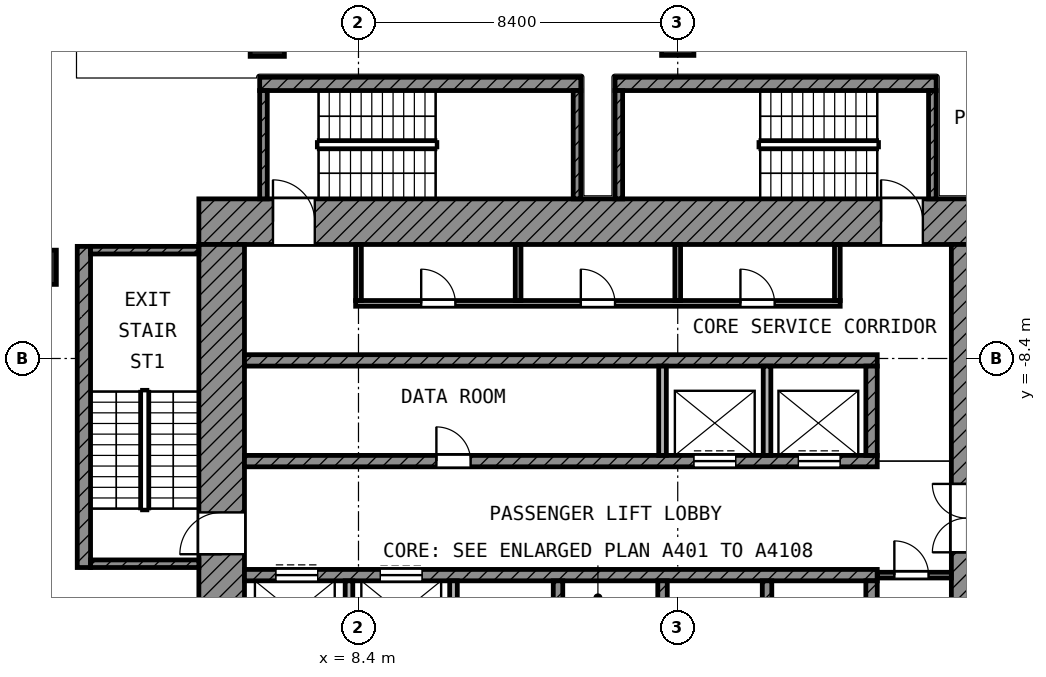
"""IFC4 building model, lengths in metres.
Left out: names, types, materials, properties, quantities, classifications, styles, units other than length and angle.
Written with IfcOpenShell. Run it as: python <this file> out.ifc"""

import sys

from ifc_helpers import new_model, si_unit, direction, frame, frame_2d, origin, origin_2d, place, context, subcontext, project, spatial, rectangle, extrude, element, fill, save


model = new_model("IFC4")
c1 = context("Model", 3, precision=1e-05, world=origin(), true_north=direction((0.0, 1.0)))
c2 = subcontext(c1, "Body", "Model", "MODEL_VIEW")
j1 = project(units=[si_unit("LENGTHUNIT", "METRE"), si_unit("PLANEANGLEUNIT", "RADIAN")], contexts=[c1])
p1 = place(None, origin())
s1 = spatial("IfcSite", under=j1, at=p1, CompositionType="ELEMENT")
p2 = place(p1, origin())
s2 = spatial("IfcBuilding", under=s1, at=p2, CompositionType="ELEMENT")
p3 = place(p2, frame((0.0, 0.0, 230.6)))
s3 = spatial("IfcBuildingStorey", under=s2, at=p3, CompositionType="ELEMENT", Elevation=230.6)
p4 = place(p3, frame((6.0, 0.0, 0.0), z_axis=(0.0, 0.0, 1.0), x_axis=(1.0, 0.0, 0.0)))
e1 = element("IfcColumn", 1, at=p4, inside=s3, PredefinedType="COLUMN", context=c2, shape_type="SweptSolid", body=[
    extrude(rectangle(XDim=0.9, YDim=0.9, at=origin_2d()), origin(), (0.0, 0.0, 1.0), 4.2),
])
p5 = place(p3, frame((16.8, 0.0, 0.0), z_axis=(0.0, 0.0, 1.0), x_axis=(1.0, 0.0, 0.0)))
e2 = element("IfcColumn", 2, at=p5, inside=s3, PredefinedType="COLUMN", context=c2, shape_type="SweptSolid", body=[
    extrude(rectangle(XDim=0.85, YDim=0.85, at=origin_2d()), origin(), (0.0, 0.0, 1.0), 4.2),
])
p6 = place(p3, frame((0.0, -6.0, 0.0), z_axis=(0.0, 0.0, 1.0), x_axis=(1.0, 0.0, 0.0)))
e3 = element("IfcColumn", 3, at=p6, inside=s3, PredefinedType="COLUMN", context=c2, shape_type="SweptSolid", body=[
    extrude(rectangle(XDim=0.9, YDim=0.9, at=origin_2d()), origin(), (0.0, 0.0, 1.0), 4.2),
])
p7 = place(p3, frame((4.2, -4.8, 0.0), z_axis=(0.0, 0.0, 1.0), x_axis=(1.0, 0.0, 0.0)))
e4 = element("IfcWall", 4, at=p7, inside=s3, PredefinedType="SHEAR", context=c2, shape_type="SweptSolid", body=[
    extrude(rectangle(XDim=20.6, YDim=1.2, at=frame_2d((10.3, 0.0))), origin(), (0.0, 0.0, 1.0), 3.6),
])
p8 = place(p7, frame((1.95, 0.0, 0.0)))
e5 = element("IfcOpeningElement", 5, at=p8, cuts=e4, PredefinedType="OPENING", context=c2, shape_type="SweptSolid", body=[
    extrude(rectangle(XDim=1.1, YDim=2.1, at=frame_2d((0.55, 1.05))), frame((0.0, 0.61, 0.0), z_axis=(0.0, -1.0, 0.0), x_axis=(1.0, 0.0, 0.0)), (0.0, 0.0, 1.0), 1.22),
])
p9 = place(p7, frame((17.95, 0.0, 0.0)))
e6 = element("IfcOpeningElement", 6, at=p9, cuts=e4, PredefinedType="OPENING", context=c2, shape_type="SweptSolid", body=[
    extrude(rectangle(XDim=1.1, YDim=2.1, at=frame_2d((0.55, 1.05))), frame((0.0, 0.61, 0.0), z_axis=(0.0, -1.0, 0.0), x_axis=(1.0, 0.0, 0.0)), (0.0, 0.0, 1.0), 1.22),
])
p10 = place(p3, frame((4.8, -24.8, 0.0), z_axis=(0.0, 0.0, 1.0), x_axis=(0.0, 1.0, 0.0)))
e7 = element("IfcWall", 7, at=p10, inside=s3, PredefinedType="SHEAR", context=c2, shape_type="SweptSolid", body=[
    extrude(rectangle(XDim=19.4, YDim=1.2, at=frame_2d((9.7, 0.0))), origin(), (0.0, 0.0, 1.0), 3.6),
])
p11 = place(p10, frame((11.25, 0.0, 0.0)))
e8 = element("IfcOpeningElement", 8, at=p11, cuts=e7, PredefinedType="OPENING", context=c2, shape_type="SweptSolid", body=[
    extrude(rectangle(XDim=1.1, YDim=2.1, at=frame_2d((0.55, 1.05))), frame((0.0, 0.61, 0.0), z_axis=(0.0, -1.0, 0.0), x_axis=(1.0, 0.0, 0.0)), (0.0, 0.0, 1.0), 1.22),
])
p12 = place(p10, frame((1.95, 0.0, 0.0)))
e9 = element("IfcOpeningElement", 9, at=p12, cuts=e7, PredefinedType="OPENING", context=c2, shape_type="SweptSolid", body=[
    extrude(rectangle(XDim=1.1, YDim=2.1, at=frame_2d((0.55, 1.05))), frame((0.0, 0.61, 0.0), z_axis=(0.0, -1.0, 0.0), x_axis=(1.0, 0.0, 0.0)), (0.0, 0.0, 1.0), 1.22),
])
p13 = place(p3, frame((24.4, -24.0, 0.0), z_axis=(0.0, 0.0, 1.0), x_axis=(0.0, 1.0, 0.0)))
e10 = element("IfcWall", 10, at=p13, inside=s3, PredefinedType="SHEAR", context=c2, shape_type="SweptSolid", body=[
    extrude(rectangle(XDim=18.6, YDim=0.8, at=frame_2d((9.3, 0.0))), origin(), (0.0, 0.0, 1.0), 3.6),
])
p14 = place(p13, frame((10.5, 0.0, 0.0)))
e11 = element("IfcOpeningElement", 11, at=p14, cuts=e10, PredefinedType="OPENING", context=c2, shape_type="SweptSolid", body=[
    extrude(rectangle(XDim=1.8, YDim=2.1, at=frame_2d((0.9, 1.05))), frame((0.0, 0.41, 0.0), z_axis=(0.0, -1.0, 0.0), x_axis=(1.0, 0.0, 0.0)), (0.0, 0.0, 1.0), 0.82),
])
p15 = place(p3, frame((5.4, -8.45, 0.0), z_axis=(0.0, 0.0, 1.0), x_axis=(1.0, 0.0, 0.0)))
e12 = element("IfcWall", 12, at=p15, inside=s3, PredefinedType="SHEAR", context=c2, shape_type="SweptSolid", body=[
    extrude(rectangle(XDim=16.65, YDim=0.3, at=frame_2d((8.325, 0.0))), origin(), (0.0, 0.0, 1.0), 3.6),
])
p16 = place(p3, frame((5.4, -11.1, 0.0), z_axis=(0.0, 0.0, 1.0), x_axis=(1.0, 0.0, 0.0)))
e13 = element("IfcWall", 13, at=p16, inside=s3, PredefinedType="SHEAR", context=c2, shape_type="SweptSolid", body=[
    extrude(rectangle(XDim=16.65, YDim=0.3, at=frame_2d((8.325, 0.0))), origin(), (0.0, 0.0, 1.0), 3.6),
])
p17 = place(p16, frame((11.825, 0.0, 0.0)))
e14 = element("IfcOpeningElement", 14, at=p17, cuts=e13, PredefinedType="OPENING", context=c2, shape_type="SweptSolid", body=[
    extrude(rectangle(XDim=1.1, YDim=2.1, at=frame_2d((0.55, 1.05))), frame((0.0, 0.16, 0.0), z_axis=(0.0, -1.0, 0.0), x_axis=(1.0, 0.0, 0.0)), (0.0, 0.0, 1.0), 0.32),
])
p18 = place(p16, frame((14.575, 0.0, 0.0)))
e15 = element("IfcOpeningElement", 15, at=p18, cuts=e13, PredefinedType="OPENING", context=c2, shape_type="SweptSolid", body=[
    extrude(rectangle(XDim=1.1, YDim=2.1, at=frame_2d((0.55, 1.05))), frame((0.0, 0.16, 0.0), z_axis=(0.0, -1.0, 0.0), x_axis=(1.0, 0.0, 0.0)), (0.0, 0.0, 1.0), 0.32),
])
p19 = place(p16, frame((5.05, 0.0, 0.0)))
e16 = element("IfcOpeningElement", 16, at=p19, cuts=e13, PredefinedType="OPENING", context=c2, shape_type="SweptSolid", body=[
    extrude(rectangle(XDim=0.9, YDim=2.1, at=frame_2d((0.45, 1.05))), frame((0.0, 0.16, 0.0), z_axis=(0.0, -1.0, 0.0), x_axis=(1.0, 0.0, 0.0)), (0.0, 0.0, 1.0), 0.32),
])
p20 = place(p3, frame((5.4, -14.1, 0.0), z_axis=(0.0, 0.0, 1.0), x_axis=(1.0, 0.0, 0.0)))
e17 = element("IfcWall", 17, at=p20, inside=s3, PredefinedType="SHEAR", context=c2, shape_type="SweptSolid", body=[
    extrude(rectangle(XDim=16.65, YDim=0.3, at=frame_2d((8.325, 0.0))), origin(), (0.0, 0.0, 1.0), 3.6),
])
p21 = place(p20, frame((0.825, 0.0, 0.0)))
e18 = element("IfcOpeningElement", 18, at=p21, cuts=e17, PredefinedType="OPENING", context=c2, shape_type="SweptSolid", body=[
    extrude(rectangle(XDim=1.1, YDim=2.1, at=frame_2d((0.55, 1.05))), frame((0.0, 0.16, 0.0), z_axis=(0.0, -1.0, 0.0), x_axis=(1.0, 0.0, 0.0)), (0.0, 0.0, 1.0), 0.32),
])
p22 = place(p20, frame((3.575, 0.0, 0.0)))
e19 = element("IfcOpeningElement", 19, at=p22, cuts=e17, PredefinedType="OPENING", context=c2, shape_type="SweptSolid", body=[
    extrude(rectangle(XDim=1.1, YDim=2.1, at=frame_2d((0.55, 1.05))), frame((0.0, 0.16, 0.0), z_axis=(0.0, -1.0, 0.0), x_axis=(1.0, 0.0, 0.0)), (0.0, 0.0, 1.0), 0.32),
])
p23 = place(p3, frame((21.9, -10.95, 0.0), z_axis=(0.0, 0.0, 1.0), x_axis=(0.0, 1.0, 0.0)))
e20 = element("IfcWall", 20, at=p23, inside=s3, PredefinedType="SHEAR", context=c2, shape_type="SweptSolid", body=[
    extrude(rectangle(XDim=2.35, YDim=0.3, at=frame_2d((1.175, 0.0))), origin(), (0.0, 0.0, 1.0), 3.6),
])
p24 = place(p3, frame((21.9, -16.6, 0.0), z_axis=(0.0, 0.0, 1.0), x_axis=(0.0, 1.0, 0.0)))
e21 = element("IfcWall", 21, at=p24, inside=s3, PredefinedType="SHEAR", context=c2, shape_type="SweptSolid", body=[
    extrude(rectangle(XDim=2.35, YDim=0.3, at=frame_2d((1.175, 0.0))), origin(), (0.0, 0.0, 1.0), 3.6),
])
for number, where, z_axis, x_axis in (
    (22, (16.4, -10.95, 0.0), (0.0, 0.0, 1.0), (0.0, 1.0, 0.0)),
    (23, (19.15, -10.95, 0.0), (0.0, 0.0, 1.0), (0.0, 1.0, 0.0)),
):
    element("IfcWall", number, at=place(p3, frame(where, z_axis=z_axis, x_axis=x_axis)), inside=s3, PredefinedType="PARTITIONING", context=c2, shape_type="SweptSolid", body=[
        extrude(rectangle(XDim=2.35, YDim=0.2, at=frame_2d((1.175, 0.0))), origin(), (0.0, 0.0, 1.0), 3.6),
    ])
for number, where, z_axis, x_axis in (
    (24, (8.15, -16.6, 0.0), (0.0, 0.0, 1.0), (0.0, 1.0, 0.0)),
    (25, (10.9, -16.6, 0.0), (0.0, 0.0, 1.0), (0.0, 1.0, 0.0)),
):
    element("IfcWall", number, at=place(p3, frame(where, z_axis=z_axis, x_axis=x_axis)), inside=s3, PredefinedType="PARTITIONING", context=c2, shape_type="SweptSolid", body=[
        extrude(rectangle(XDim=2.35, YDim=0.2, at=frame_2d((1.175, 0.0))), origin(), (0.0, 0.0, 1.0), 3.6),
    ])
for number, where, z_axis, x_axis in (
    (26, (13.65, -16.6, 0.0), (0.0, 0.0, 1.0), (0.0, 1.0, 0.0)),
    (27, (16.4, -16.6, 0.0), (0.0, 0.0, 1.0), (0.0, 1.0, 0.0)),
    (28, (19.15, -16.6, 0.0), (0.0, 0.0, 1.0), (0.0, 1.0, 0.0)),
):
    element("IfcWall", number, at=place(p3, frame(where, z_axis=z_axis, x_axis=x_axis)), inside=s3, PredefinedType="SHEAR", context=c2, shape_type="SweptSolid", body=[
        extrude(rectangle(XDim=2.35, YDim=0.25, at=frame_2d((1.175, 0.0))), origin(), (0.0, 0.0, 1.0), 3.6),
    ])
p25 = place(p3, frame((22.05, -14.1, 0.0), z_axis=(0.0, 0.0, 1.0), x_axis=(1.0, 0.0, 0.0)))
e29 = element("IfcWall", 29, at=p25, inside=s3, PredefinedType="PARTITIONING", context=c2, shape_type="SweptSolid", body=[
    extrude(rectangle(XDim=1.95, YDim=0.15, at=frame_2d((0.975, 0.0))), origin(), (0.0, 0.0, 1.0), 3.6),
])
p26 = place(p25, frame((0.45, 0.0, 0.0)))
e30 = element("IfcOpeningElement", 30, at=p26, cuts=e29, PredefinedType="OPENING", context=c2, shape_type="SweptSolid", body=[
    extrude(rectangle(XDim=0.9, YDim=2.1, at=frame_2d((0.45, 1.05))), frame((0.0, 0.085, 0.0), z_axis=(0.0, -1.0, 0.0), x_axis=(1.0, 0.0, 0.0)), (0.0, 0.0, 1.0), 0.17),
])
p27 = place(p3, frame((8.325, -6.95, 0.0), z_axis=(0.0, 0.0, 1.0), x_axis=(1.0, 0.0, 0.0)))
e31 = element("IfcWall", 31, at=p27, inside=s3, PredefinedType="PARTITIONING", context=c2, shape_type="SweptSolid", body=[
    extrude(rectangle(XDim=12.75, YDim=0.15, at=frame_2d((6.375, 0.0))), origin(), (0.0, 0.0, 1.0), 3.6),
])
p28 = place(p27, frame((1.725, 0.0, 0.0)))
e32 = element("IfcOpeningElement", 32, at=p28, cuts=e31, PredefinedType="OPENING", context=c2, shape_type="SweptSolid", body=[
    extrude(rectangle(XDim=0.9, YDim=2.1, at=frame_2d((0.45, 1.05))), frame((0.0, 0.085, 0.0), z_axis=(0.0, -1.0, 0.0), x_axis=(1.0, 0.0, 0.0)), (0.0, 0.0, 1.0), 0.17),
])
p29 = place(p27, frame((5.925, 0.0, 0.0)))
e33 = element("IfcOpeningElement", 33, at=p29, cuts=e31, PredefinedType="OPENING", context=c2, shape_type="SweptSolid", body=[
    extrude(rectangle(XDim=0.9, YDim=2.1, at=frame_2d((0.45, 1.05))), frame((0.0, 0.085, 0.0), z_axis=(0.0, -1.0, 0.0), x_axis=(1.0, 0.0, 0.0)), (0.0, 0.0, 1.0), 0.17),
])
p30 = place(p27, frame((10.125, 0.0, 0.0)))
e34 = element("IfcOpeningElement", 34, at=p30, cuts=e31, PredefinedType="OPENING", context=c2, shape_type="SweptSolid", body=[
    extrude(rectangle(XDim=0.9, YDim=2.1, at=frame_2d((0.45, 1.05))), frame((0.0, 0.085, 0.0), z_axis=(0.0, -1.0, 0.0), x_axis=(1.0, 0.0, 0.0)), (0.0, 0.0, 1.0), 0.17),
])
for number, where, z_axis, x_axis in (
    (35, (8.4, -6.875, 0.0), (0.0, 0.0, 1.0), (0.0, 1.0, 0.0)),
    (36, (12.6, -6.875, 0.0), (0.0, 0.0, 1.0), (0.0, 1.0, 0.0)),
    (37, (16.8, -6.875, 0.0), (0.0, 0.0, 1.0), (0.0, 1.0, 0.0)),
    (38, (21.0, -6.875, 0.0), (0.0, 0.0, 1.0), (0.0, 1.0, 0.0)),
):
    element("IfcWall", number, at=place(p3, frame(where, z_axis=z_axis, x_axis=x_axis)), inside=s3, PredefinedType="PARTITIONING", context=c2, shape_type="SweptSolid", body=[
        extrude(rectangle(XDim=1.475, YDim=0.15, at=frame_2d((0.738, 0.0))), origin(), (0.0, 0.0, 1.0), 3.6),
    ])
p31 = place(p3, frame((1.175, -13.9, 0.0), z_axis=(0.0, 0.0, 1.0), x_axis=(0.0, 1.0, 0.0)))
e39 = element("IfcWall", 39, at=p31, inside=s3, PredefinedType="SHEAR", context=c2, shape_type="SweptSolid", body=[
    extrude(rectangle(XDim=8.45, YDim=0.35, at=frame_2d((4.225, 0.0))), origin(), (0.0, 0.0, 1.0), 3.6),
])
for number, where, z_axis, x_axis in (
    (40, (1.35, -5.55, 0.0), (0.0, 0.0, 1.0), (1.0, 0.0, 0.0)),
    (41, (1.35, -13.8, 0.0), (0.0, 0.0, 1.0), (1.0, 0.0, 0.0)),
):
    element("IfcWall", number, at=place(p3, frame(where, z_axis=z_axis, x_axis=x_axis)), inside=s3, PredefinedType="SHEAR", context=c2, shape_type="SweptSolid", body=[
        extrude(rectangle(XDim=2.85, YDim=0.2, at=frame_2d((1.425, 0.0))), origin(), (0.0, 0.0, 1.0), 3.6),
    ])
p32 = place(p3, frame((5.8, -1.175, 0.0), z_axis=(0.0, 0.0, 1.0), x_axis=(1.0, 0.0, 0.0)))
e42 = element("IfcWall", 42, at=p32, inside=s3, PredefinedType="SHEAR", context=c2, shape_type="SweptSolid", body=[
    extrude(rectangle(XDim=8.45, YDim=0.35, at=frame_2d((4.225, 0.0))), origin(), (0.0, 0.0, 1.0), 3.6),
])
for number, where, z_axis, x_axis in (
    (43, (5.9, -4.2, 0.0), (0.0, 0.0, 1.0), (0.0, 1.0, 0.0)),
    (44, (14.15, -4.2, 0.0), (0.0, 0.0, 1.0), (0.0, 1.0, 0.0)),
):
    element("IfcWall", number, at=place(p3, frame(where, z_axis=z_axis, x_axis=x_axis)), inside=s3, PredefinedType="SHEAR", context=c2, shape_type="SweptSolid", body=[
        extrude(rectangle(XDim=2.85, YDim=0.2, at=frame_2d((1.425, 0.0))), origin(), (0.0, 0.0, 1.0), 3.6),
    ])
p33 = place(p3, frame((15.15, -1.175, 0.0), z_axis=(0.0, 0.0, 1.0), x_axis=(1.0, 0.0, 0.0)))
e45 = element("IfcWall", 45, at=p33, inside=s3, PredefinedType="SHEAR", context=c2, shape_type="SweptSolid", body=[
    extrude(rectangle(XDim=8.45, YDim=0.35, at=frame_2d((4.225, 0.0))), origin(), (0.0, 0.0, 1.0), 3.6),
])
for number, where, z_axis, x_axis in (
    (46, (15.25, -4.2, 0.0), (0.0, 0.0, 1.0), (0.0, 1.0, 0.0)),
    (47, (23.5, -4.2, 0.0), (0.0, 0.0, 1.0), (0.0, 1.0, 0.0)),
):
    element("IfcWall", number, at=place(p3, frame(where, z_axis=z_axis, x_axis=x_axis)), inside=s3, PredefinedType="SHEAR", context=c2, shape_type="SweptSolid", body=[
        extrude(rectangle(XDim=2.85, YDim=0.2, at=frame_2d((1.425, 0.0))), origin(), (0.0, 0.0, 1.0), 3.6),
    ])
p34 = place(p17, origin())
e48 = element("IfcDoor", 48, at=p34, inside=s3, OperationType="DOUBLE_DOOR_SLIDING", PredefinedType="DOOR", context=c2, shape_type="SweptSolid", body=[
    extrude(rectangle(XDim=1.1, YDim=2.1, at=frame_2d((0.55, 1.05))), frame((0.0, 0.025, 0.0), z_axis=(0.0, -1.0, 0.0), x_axis=(1.0, 0.0, 0.0)), (0.0, 0.0, 1.0), 0.05),
])
fill(e14, e48)
p35 = place(p18, origin())
e49 = element("IfcDoor", 49, at=p35, inside=s3, OperationType="DOUBLE_DOOR_SLIDING", PredefinedType="DOOR", context=c2, shape_type="SweptSolid", body=[
    extrude(rectangle(XDim=1.1, YDim=2.1, at=frame_2d((0.55, 1.05))), frame((0.0, 0.025, 0.0), z_axis=(0.0, -1.0, 0.0), x_axis=(1.0, 0.0, 0.0)), (0.0, 0.0, 1.0), 0.05),
])
fill(e15, e49)
p36 = place(p21, origin())
e50 = element("IfcDoor", 50, at=p36, inside=s3, OperationType="DOUBLE_DOOR_SLIDING", PredefinedType="DOOR", context=c2, shape_type="SweptSolid", body=[
    extrude(rectangle(XDim=1.1, YDim=2.1, at=frame_2d((0.55, 1.05))), frame((0.0, 0.025, 0.0), z_axis=(0.0, -1.0, 0.0), x_axis=(1.0, 0.0, 0.0)), (0.0, 0.0, 1.0), 0.05),
])
fill(e18, e50)
p37 = place(p22, origin())
e51 = element("IfcDoor", 51, at=p37, inside=s3, OperationType="DOUBLE_DOOR_SLIDING", PredefinedType="DOOR", context=c2, shape_type="SweptSolid", body=[
    extrude(rectangle(XDim=1.1, YDim=2.1, at=frame_2d((0.55, 1.05))), frame((0.0, 0.025, 0.0), z_axis=(0.0, -1.0, 0.0), x_axis=(1.0, 0.0, 0.0)), (0.0, 0.0, 1.0), 0.05),
])
fill(e19, e51)
p38 = place(p11, origin())
e52 = element("IfcDoor", 52, at=p38, inside=s3, OperationType="SINGLE_SWING_LEFT", PredefinedType="DOOR", context=c2, shape_type="SweptSolid", body=[
    extrude(rectangle(XDim=1.1, YDim=2.1, at=frame_2d((0.55, 1.05))), frame((0.0, 0.025, 0.0), z_axis=(0.0, -1.0, 0.0), x_axis=(1.0, 0.0, 0.0)), (0.0, 0.0, 1.0), 0.05),
])
fill(e8, e52)
p39 = place(p8, origin())
e53 = element("IfcDoor", 53, at=p39, inside=s3, OperationType="SINGLE_SWING_LEFT", PredefinedType="DOOR", context=c2, shape_type="SweptSolid", body=[
    extrude(rectangle(XDim=1.1, YDim=2.1, at=frame_2d((0.55, 1.05))), frame((0.0, 0.025, 0.0), z_axis=(0.0, -1.0, 0.0), x_axis=(1.0, 0.0, 0.0)), (0.0, 0.0, 1.0), 0.05),
])
fill(e5, e53)
p40 = place(p9, origin())
e54 = element("IfcDoor", 54, at=p40, inside=s3, OperationType="SINGLE_SWING_LEFT", PredefinedType="DOOR", context=c2, shape_type="SweptSolid", body=[
    extrude(rectangle(XDim=1.1, YDim=2.1, at=frame_2d((0.55, 1.05))), frame((0.0, 0.025, 0.0), z_axis=(0.0, -1.0, 0.0), x_axis=(1.0, 0.0, 0.0)), (0.0, 0.0, 1.0), 0.05),
])
fill(e6, e54)
p41 = place(p14, origin())
e55 = element("IfcDoor", 55, at=p41, inside=s3, OperationType="DOUBLE_DOOR_SINGLE_SWING", PredefinedType="DOOR", context=c2, shape_type="SweptSolid", body=[
    extrude(rectangle(XDim=1.8, YDim=2.1, at=frame_2d((0.9, 1.05))), frame((0.0, 0.025, 0.0), z_axis=(0.0, -1.0, 0.0), x_axis=(1.0, 0.0, 0.0)), (0.0, 0.0, 1.0), 0.05),
])
fill(e11, e55)
p42 = place(p28, origin())
e56 = element("IfcDoor", 56, at=p42, inside=s3, OperationType="SINGLE_SWING_LEFT", PredefinedType="DOOR", context=c2, shape_type="SweptSolid", body=[
    extrude(rectangle(XDim=0.9, YDim=2.1, at=frame_2d((0.45, 1.05))), frame((0.0, 0.025, 0.0), z_axis=(0.0, -1.0, 0.0), x_axis=(1.0, 0.0, 0.0)), (0.0, 0.0, 1.0), 0.05),
])
fill(e32, e56)
p43 = place(p29, origin())
e57 = element("IfcDoor", 57, at=p43, inside=s3, OperationType="SINGLE_SWING_LEFT", PredefinedType="DOOR", context=c2, shape_type="SweptSolid", body=[
    extrude(rectangle(XDim=0.9, YDim=2.1, at=frame_2d((0.45, 1.05))), frame((0.0, 0.025, 0.0), z_axis=(0.0, -1.0, 0.0), x_axis=(1.0, 0.0, 0.0)), (0.0, 0.0, 1.0), 0.05),
])
fill(e33, e57)
p44 = place(p30, origin())
e58 = element("IfcDoor", 58, at=p44, inside=s3, OperationType="SINGLE_SWING_LEFT", PredefinedType="DOOR", context=c2, shape_type="SweptSolid", body=[
    extrude(rectangle(XDim=0.9, YDim=2.1, at=frame_2d((0.45, 1.05))), frame((0.0, 0.025, 0.0), z_axis=(0.0, -1.0, 0.0), x_axis=(1.0, 0.0, 0.0)), (0.0, 0.0, 1.0), 0.05),
])
fill(e34, e58)
p45 = place(p26, origin())
e59 = element("IfcDoor", 59, at=p45, inside=s3, OperationType="SINGLE_SWING_LEFT", PredefinedType="DOOR", context=c2, shape_type="SweptSolid", body=[
    extrude(rectangle(XDim=0.9, YDim=2.1, at=frame_2d((0.45, 1.05))), frame((0.0, 0.025, 0.0), z_axis=(0.0, -1.0, 0.0), x_axis=(1.0, 0.0, 0.0)), (0.0, 0.0, 1.0), 0.05),
])
fill(e30, e59)
p46 = place(p19, origin())
e60 = element("IfcDoor", 60, at=p46, inside=s3, OperationType="SINGLE_SWING_LEFT", PredefinedType="DOOR", context=c2, shape_type="SweptSolid", body=[
    extrude(rectangle(XDim=0.9, YDim=2.1, at=frame_2d((0.45, 1.05))), frame((0.0, 0.025, 0.0), z_axis=(0.0, -1.0, 0.0), x_axis=(1.0, 0.0, 0.0)), (0.0, 0.0, 1.0), 0.05),
])
fill(e16, e60)
save(model, sys.argv[1])
